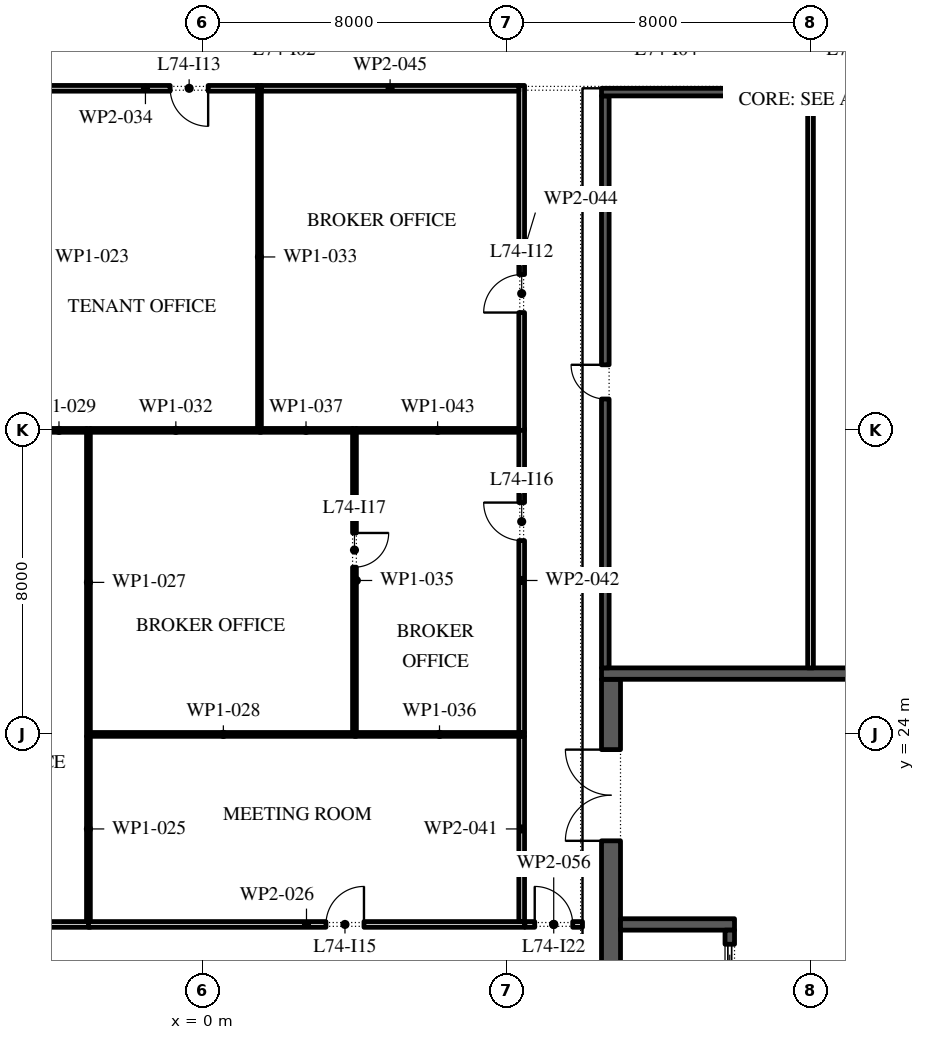
"""IFC4 building model, lengths in metres.
Left out: names, types, materials, properties, quantities, classifications, styles, units other than length and angle.
Written with IfcOpenShell. Run it as: python <this file> out.ifc"""

import sys

from ifc_helpers import new_model, si_unit, direction, frame, frame_2d, origin, place, context, subcontext, project, spatial, rectangle, extrude, element, fill, save


model = new_model("IFC4")
c1 = context("Model", 3, precision=1e-05, world=origin(), true_north=direction((0.0, 1.0)))
c2 = subcontext(c1, "Body", "Model", "MODEL_VIEW")
j1 = project(units=[si_unit("LENGTHUNIT", "METRE"), si_unit("PLANEANGLEUNIT", "RADIAN")], contexts=[c1])
p1 = place(None, origin())
s1 = spatial("IfcSite", under=j1, at=p1, CompositionType="ELEMENT")
p2 = place(p1, origin())
s2 = spatial("IfcBuilding", under=s1, at=p2, CompositionType="ELEMENT")
p3 = place(p2, frame((0.0, 0.0, 338.4)))
s3 = spatial("IfcBuildingStorey", under=s2, at=p3, CompositionType="ELEMENT", Elevation=338.4)
p4 = place(p3, frame((10.75, -2.45, 0.0), z_axis=(0.0, 0.0, 1.0), x_axis=(0.0, 1.0, 0.0)))
e1 = element("IfcWall", 1, at=p4, inside=s3, PredefinedType="SHEAR", context=c2, shape_type="SweptSolid", body=[
    extrude(rectangle(XDim=27.9, YDim=0.5, at=frame_2d((13.95, 0.0))), origin(), (0.0, 0.0, 1.0), 4.0),
])
p5 = place(p4, frame((23.65, 0.0, 0.0)))
e2 = element("IfcOpeningElement", 2, at=p5, cuts=e1, PredefinedType="OPENING", context=c2, shape_type="SweptSolid", body=[
    extrude(rectangle(XDim=2.4, YDim=2.1, at=frame_2d((1.2, 1.05))), frame((0.0, 0.26, 0.0), z_axis=(0.0, -1.0, 0.0), x_axis=(1.0, 0.0, 0.0)), (0.0, 0.0, 1.0), 0.52),
])
p6 = place(p4, frame((1.387, 0.0, 0.0)))
e3 = element("IfcOpeningElement", 3, at=p6, cuts=e1, PredefinedType="OPENING", context=c2, shape_type="SweptSolid", body=[
    extrude(rectangle(XDim=0.9, YDim=2.1, at=frame_2d((0.45, 1.05))), frame((0.0, 0.26, 0.0), z_axis=(0.0, -1.0, 0.0), x_axis=(1.0, 0.0, 0.0)), (0.0, 0.0, 1.0), 0.52),
])
p7 = place(p4, frame((4.562, 0.0, 0.0)))
e4 = element("IfcOpeningElement", 4, at=p7, cuts=e1, PredefinedType="OPENING", context=c2, shape_type="SweptSolid", body=[
    extrude(rectangle(XDim=1.0, YDim=2.1, at=frame_2d((0.5, 1.05))), frame((0.0, 0.26, 0.0), z_axis=(0.0, -1.0, 0.0), x_axis=(1.0, 0.0, 0.0)), (0.0, 0.0, 1.0), 0.52),
])
p8 = place(p3, frame((10.5, 25.6, 0.0), z_axis=(0.0, 0.0, 1.0), x_axis=(1.0, 0.0, 0.0)))
e5 = element("IfcWall", 5, at=p8, inside=s3, PredefinedType="SHEAR", context=c2, shape_type="SweptSolid", body=[
    extrude(rectangle(XDim=11.0, YDim=0.3, at=frame_2d((5.5, 0.0))), origin(), (0.0, 0.0, 1.0), 4.0),
])
p9 = place(p3, frame((11.0, 19.0, 0.0), z_axis=(0.0, 0.0, 1.0), x_axis=(1.0, 0.0, 0.0)))
e6 = element("IfcWall", 6, at=p9, inside=s3, PredefinedType="SHEAR", context=c2, shape_type="SweptSolid", body=[
    extrude(rectangle(XDim=3.0, YDim=0.3, at=frame_2d((1.5, 0.0))), origin(), (0.0, 0.0, 1.0), 4.0),
])
p10 = place(p3, frame((13.875, -2.45, 0.0), z_axis=(0.0, 0.0, 1.0), x_axis=(0.0, 1.0, 0.0)))
e7 = element("IfcWall", 7, at=p10, inside=s3, PredefinedType="SHEAR", context=c2, shape_type="SweptSolid", body=[
    extrude(rectangle(XDim=21.3, YDim=0.25, at=frame_2d((10.65, 0.0))), origin(), (0.0, 0.0, 1.0), 4.0),
])
p11 = place(p10, frame((9.846, 0.0, 0.0)))
e8 = element("IfcOpeningElement", 8, at=p11, cuts=e7, PredefinedType="OPENING", context=c2, shape_type="SweptSolid", body=[
    extrude(rectangle(XDim=0.9, YDim=2.1, at=frame_2d((0.45, 1.05))), frame((0.0, 0.135, 0.0), z_axis=(0.0, -1.0, 0.0), x_axis=(1.0, 0.0, 0.0)), (0.0, 0.0, 1.0), 0.27),
])
p12 = place(p10, frame((12.911, 0.0, 0.0)))
e9 = element("IfcOpeningElement", 9, at=p12, cuts=e7, PredefinedType="OPENING", context=c2, shape_type="SweptSolid", body=[
    extrude(rectangle(XDim=0.9, YDim=2.1, at=frame_2d((0.45, 1.05))), frame((0.0, 0.135, 0.0), z_axis=(0.0, -1.0, 0.0), x_axis=(1.0, 0.0, 0.0)), (0.0, 0.0, 1.0), 0.27),
])
p13 = place(p10, frame((6.971, 0.0, 0.0)))
e10 = element("IfcOpeningElement", 10, at=p13, cuts=e7, PredefinedType="OPENING", context=c2, shape_type="SweptSolid", body=[
    extrude(rectangle(XDim=1.1, YDim=2.1, at=frame_2d((0.55, 1.05))), frame((0.0, 0.135, 0.0), z_axis=(0.0, -1.0, 0.0), x_axis=(1.0, 0.0, 0.0)), (0.0, 0.0, 1.0), 0.27),
])
p14 = place(p10, frame((15.543, 0.0, 0.0)))
e11 = element("IfcOpeningElement", 11, at=p14, cuts=e7, PredefinedType="OPENING", context=c2, shape_type="SweptSolid", body=[
    extrude(rectangle(XDim=1.1, YDim=2.1, at=frame_2d((0.55, 1.05))), frame((0.0, 0.135, 0.0), z_axis=(0.0, -1.0, 0.0), x_axis=(1.0, 0.0, 0.0)), (0.0, 0.0, 1.0), 0.27),
])
p15 = place(p10, frame((17.686, 0.0, 0.0)))
e12 = element("IfcOpeningElement", 12, at=p15, cuts=e7, PredefinedType="OPENING", context=c2, shape_type="SweptSolid", body=[
    extrude(rectangle(XDim=1.1, YDim=2.1, at=frame_2d((0.55, 1.05))), frame((0.0, 0.135, 0.0), z_axis=(0.0, -1.0, 0.0), x_axis=(1.0, 0.0, 0.0)), (0.0, 0.0, 1.0), 0.27),
])
p16 = place(p10, frame((19.829, 0.0, 0.0)))
e13 = element("IfcOpeningElement", 13, at=p16, cuts=e7, PredefinedType="OPENING", context=c2, shape_type="SweptSolid", body=[
    extrude(rectangle(XDim=1.1, YDim=2.1, at=frame_2d((0.55, 1.05))), frame((0.0, 0.135, 0.0), z_axis=(0.0, -1.0, 0.0), x_axis=(1.0, 0.0, 0.0)), (0.0, 0.0, 1.0), 0.27),
])
p17 = place(p3, frame((10.6, 25.75, 0.0), z_axis=(0.0, 0.0, 1.0), x_axis=(0.0, 1.0, 0.0)))
e14 = element("IfcWall", 14, at=p17, inside=s3, PredefinedType="SHEAR", context=c2, shape_type="SweptSolid", body=[
    extrude(rectangle(XDim=15.05, YDim=0.2, at=frame_2d((7.525, 0.0))), origin(), (0.0, 0.0, 1.0), 4.0),
])
p18 = place(p17, frame((7.075, 0.0, 0.0)))
e15 = element("IfcOpeningElement", 15, at=p18, cuts=e14, PredefinedType="OPENING", context=c2, shape_type="SweptSolid", body=[
    extrude(rectangle(XDim=0.9, YDim=2.1, at=frame_2d((0.45, 1.05))), frame((0.0, 0.11, 0.0), z_axis=(0.0, -1.0, 0.0), x_axis=(1.0, 0.0, 0.0)), (0.0, 0.0, 1.0), 0.22),
])
p19 = place(p3, frame((10.5, 40.9, 0.0), z_axis=(0.0, 0.0, 1.0), x_axis=(1.0, 0.0, 0.0)))
e16 = element("IfcWall", 16, at=p19, inside=s3, PredefinedType="SHEAR", context=c2, shape_type="SweptSolid", body=[
    extrude(rectangle(XDim=11.0, YDim=0.2, at=frame_2d((5.5, 0.0))), origin(), (0.0, 0.0, 1.0), 4.0),
])
p20 = place(p3, frame((16.0, 25.75, 0.0), z_axis=(0.0, 0.0, 1.0), x_axis=(0.0, 1.0, 0.0)))
e17 = element("IfcWall", 17, at=p20, inside=s3, PredefinedType="PARTITIONING", context=c2, shape_type="SweptSolid", body=[
    extrude(rectangle(XDim=15.05, YDim=0.15, at=frame_2d((7.525, 0.0))), origin(), (0.0, 0.0, 1.0), 4.0),
])
p21 = place(p3, frame((-8.475, 19.0, 0.0), z_axis=(0.0, 0.0, 1.0), x_axis=(1.0, 0.0, 0.0)))
e18 = element("IfcWall", 18, at=p21, inside=s3, PredefinedType="PARTITIONING", context=c2, shape_type="SweptSolid", body=[
    extrude(rectangle(XDim=5.525, YDim=0.15, at=frame_2d((2.763, 0.0))), origin(), (0.0, 0.0, 1.0), 4.0),
])
p22 = place(p3, frame((-3.0, 19.075, 0.0), z_axis=(0.0, 0.0, 1.0), x_axis=(0.0, 1.0, 0.0)))
e19 = element("IfcWall", 19, at=p22, inside=s3, PredefinedType="PARTITIONING", context=c2, shape_type="SweptSolid", body=[
    extrude(rectangle(XDim=4.875, YDim=0.1, at=frame_2d((2.438, 0.0))), origin(), (0.0, 0.0, 1.0), 4.0),
])
p23 = place(p3, frame((-3.0, 19.0, 0.0), z_axis=(0.0, 0.0, 1.0), x_axis=(1.0, 0.0, 0.0)))
e20 = element("IfcWall", 20, at=p23, inside=s3, PredefinedType="PARTITIONING", context=c2, shape_type="SweptSolid", body=[
    extrude(rectangle(XDim=11.475, YDim=0.15, at=frame_2d((5.738, 0.0))), origin(), (0.0, 0.0, 1.0), 4.0),
])
p24 = place(p23, frame((6.25, 0.0, 0.0)))
e21 = element("IfcOpeningElement", 21, at=p24, cuts=e20, PredefinedType="OPENING", context=c2, shape_type="SweptSolid", body=[
    extrude(rectangle(XDim=1.0, YDim=2.1, at=frame_2d((0.5, 1.05))), frame((0.0, 0.085, 0.0), z_axis=(0.0, -1.0, 0.0), x_axis=(1.0, 0.0, 0.0)), (0.0, 0.0, 1.0), 0.17),
])
p25 = place(p3, frame((-3.0, 23.95, 0.0), z_axis=(0.0, 0.0, 1.0), x_axis=(0.0, 1.0, 0.0)))
e22 = element("IfcWall", 22, at=p25, inside=s3, PredefinedType="PARTITIONING", context=c2, shape_type="SweptSolid", body=[
    extrude(rectangle(XDim=8.1, YDim=0.1, at=frame_2d((4.05, 0.0))), origin(), (0.0, 0.0, 1.0), 4.0),
])
p26 = place(p3, frame((-2.95, 24.0, 0.0), z_axis=(0.0, 0.0, 1.0), x_axis=(1.0, 0.0, 0.0)))
e23 = element("IfcWall", 23, at=p26, inside=s3, PredefinedType="PARTITIONING", context=c2, shape_type="SweptSolid", body=[
    extrude(rectangle(XDim=7.0, YDim=0.1, at=frame_2d((3.5, 0.0))), origin(), (0.0, 0.0, 1.0), 4.0),
])
p27 = place(p3, frame((-3.05, 32.0, 0.0), z_axis=(0.0, 0.0, 1.0), x_axis=(-1.0, 0.0, 0.0)))
e24 = element("IfcWall", 24, at=p27, inside=s3, PredefinedType="PARTITIONING", context=c2, shape_type="SweptSolid", body=[
    extrude(rectangle(XDim=1.45, YDim=0.1, at=frame_2d((0.725, 0.0))), origin(), (0.0, 0.0, 1.0), 4.0),
])
p28 = place(p3, frame((1.55, 32.0, 0.0), z_axis=(0.0, 0.0, 1.0), x_axis=(-1.0, 0.0, 0.0)))
e25 = element("IfcWall", 25, at=p28, inside=s3, PredefinedType="PARTITIONING", context=c2, shape_type="SweptSolid", body=[
    extrude(rectangle(XDim=4.5, YDim=0.1, at=frame_2d((2.25, 0.0))), origin(), (0.0, 0.0, 1.0), 4.0),
])
p29 = place(p3, frame((1.5, 32.05, 0.0), z_axis=(0.0, 0.0, 1.0), x_axis=(0.0, 1.0, 0.0)))
e26 = element("IfcWall", 26, at=p29, inside=s3, PredefinedType="PARTITIONING", context=c2, shape_type="SweptSolid", body=[
    extrude(rectangle(XDim=9.025, YDim=0.1, at=frame_2d((4.512, 0.0))), origin(), (0.0, 0.0, 1.0), 4.0),
])
p30 = place(p3, frame((1.45, 41.0, 0.0), z_axis=(0.0, 0.0, 1.0), x_axis=(-1.0, 0.0, 0.0)))
e27 = element("IfcWall", 27, at=p30, inside=s3, PredefinedType="PARTITIONING", context=c2, shape_type="SweptSolid", body=[
    extrude(rectangle(XDim=5.9, YDim=0.15, at=frame_2d((2.95, 0.0))), origin(), (0.0, 0.0, 1.0), 4.0),
])
p31 = place(p30, frame((1.3, 0.0, 0.0)))
e28 = element("IfcOpeningElement", 28, at=p31, cuts=e27, PredefinedType="OPENING", context=c2, shape_type="SweptSolid", body=[
    extrude(rectangle(XDim=1.0, YDim=2.1, at=frame_2d((0.5, 1.05))), frame((0.0, 0.085, 0.0), z_axis=(0.0, -1.0, 0.0), x_axis=(1.0, 0.0, 0.0)), (0.0, 0.0, 1.0), 0.17),
])
p32 = place(p3, frame((4.0, 24.05, 0.0), z_axis=(0.0, 0.0, 1.0), x_axis=(0.0, 1.0, 0.0)))
e29 = element("IfcWall", 29, at=p32, inside=s3, PredefinedType="PARTITIONING", context=c2, shape_type="SweptSolid", body=[
    extrude(rectangle(XDim=8.0, YDim=0.1, at=frame_2d((4.0, 0.0))), origin(), (0.0, 0.0, 1.0), 4.0),
])
p33 = place(p32, frame((4.35, 0.0, 0.0)))
e30 = element("IfcOpeningElement", 30, at=p33, cuts=e29, PredefinedType="OPENING", context=c2, shape_type="SweptSolid", body=[
    extrude(rectangle(XDim=0.9, YDim=2.1, at=frame_2d((0.45, 1.05))), frame((0.0, 0.06, 0.0), z_axis=(0.0, -1.0, 0.0), x_axis=(1.0, 0.0, 0.0)), (0.0, 0.0, 1.0), 0.12),
])
p34 = place(p3, frame((4.0, 24.0, 0.0), z_axis=(0.0, 0.0, 1.0), x_axis=(1.0, 0.0, 0.0)))
e31 = element("IfcWall", 31, at=p34, inside=s3, PredefinedType="PARTITIONING", context=c2, shape_type="SweptSolid", body=[
    extrude(rectangle(XDim=4.475, YDim=0.1, at=frame_2d((2.238, 0.0))), origin(), (0.0, 0.0, 1.0), 4.0),
])
p35 = place(p3, frame((3.95, 32.0, 0.0), z_axis=(0.0, 0.0, 1.0), x_axis=(-1.0, 0.0, 0.0)))
e32 = element("IfcWall", 32, at=p35, inside=s3, PredefinedType="PARTITIONING", context=c2, shape_type="SweptSolid", body=[
    extrude(rectangle(XDim=2.45, YDim=0.1, at=frame_2d((1.225, 0.0))), origin(), (0.0, 0.0, 1.0), 4.0),
])
p36 = place(p3, frame((8.4, 19.075, 0.0), z_axis=(0.0, 0.0, 1.0), x_axis=(0.0, 1.0, 0.0)))
e33 = element("IfcWall", 33, at=p36, inside=s3, PredefinedType="PARTITIONING", context=c2, shape_type="SweptSolid", body=[
    extrude(rectangle(XDim=4.875, YDim=0.15, at=frame_2d((2.438, 0.0))), origin(), (0.0, 0.0, 1.0), 4.0),
])
p37 = place(p3, frame((8.4, 24.05, 0.0), z_axis=(0.0, 0.0, 1.0), x_axis=(0.0, 1.0, 0.0)))
e34 = element("IfcWall", 34, at=p37, inside=s3, PredefinedType="PARTITIONING", context=c2, shape_type="SweptSolid", body=[
    extrude(rectangle(XDim=8.0, YDim=0.15, at=frame_2d((4.0, 0.0))), origin(), (0.0, 0.0, 1.0), 4.0),
])
p38 = place(p37, frame((5.05, 0.0, 0.0)))
e35 = element("IfcOpeningElement", 35, at=p38, cuts=e34, PredefinedType="OPENING", context=c2, shape_type="SweptSolid", body=[
    extrude(rectangle(XDim=1.0, YDim=2.1, at=frame_2d((0.5, 1.05))), frame((0.0, 0.085, 0.0), z_axis=(0.0, -1.0, 0.0), x_axis=(1.0, 0.0, 0.0)), (0.0, 0.0, 1.0), 0.17),
])
p39 = place(p3, frame((8.325, 32.0, 0.0), z_axis=(0.0, 0.0, 1.0), x_axis=(-1.0, 0.0, 0.0)))
e36 = element("IfcWall", 36, at=p39, inside=s3, PredefinedType="PARTITIONING", context=c2, shape_type="SweptSolid", body=[
    extrude(rectangle(XDim=4.275, YDim=0.1, at=frame_2d((2.137, 0.0))), origin(), (0.0, 0.0, 1.0), 4.0),
])
p40 = place(p3, frame((8.4, 32.0, 0.0), z_axis=(0.0, 0.0, 1.0), x_axis=(0.0, 1.0, 0.0)))
e37 = element("IfcWall", 37, at=p40, inside=s3, PredefinedType="PARTITIONING", context=c2, shape_type="SweptSolid", body=[
    extrude(rectangle(XDim=9.075, YDim=0.15, at=frame_2d((4.538, 0.0))), origin(), (0.0, 0.0, 1.0), 4.0),
])
p41 = place(p40, frame((3.1, 0.0, 0.0)))
e38 = element("IfcOpeningElement", 38, at=p41, cuts=e37, PredefinedType="OPENING", context=c2, shape_type="SweptSolid", body=[
    extrude(rectangle(XDim=1.0, YDim=2.1, at=frame_2d((0.5, 1.05))), frame((0.0, 0.085, 0.0), z_axis=(0.0, -1.0, 0.0), x_axis=(1.0, 0.0, 0.0)), (0.0, 0.0, 1.0), 0.17),
])
p42 = place(p3, frame((8.325, 41.0, 0.0), z_axis=(0.0, 0.0, 1.0), x_axis=(-1.0, 0.0, 0.0)))
e39 = element("IfcWall", 39, at=p42, inside=s3, PredefinedType="PARTITIONING", context=c2, shape_type="SweptSolid", body=[
    extrude(rectangle(XDim=6.775, YDim=0.15, at=frame_2d((3.387, 0.0))), origin(), (0.0, 0.0, 1.0), 4.0),
])
p43 = place(p3, frame((8.485, 19.0, 0.0), z_axis=(0.0, 0.0, 1.0), x_axis=(1.0, 0.0, 0.0)))
e40 = element("IfcWall", 40, at=p43, inside=s3, PredefinedType="PARTITIONING", context=c2, shape_type="SweptSolid", body=[
    extrude(rectangle(XDim=1.515, YDim=0.15, at=frame_2d((0.757, 0.0))), origin(), (0.0, 0.0, 1.0), 4.0),
])
p44 = place(p43, frame((0.258, 0.0, 0.0)))
e41 = element("IfcOpeningElement", 41, at=p44, cuts=e40, PredefinedType="OPENING", context=c2, shape_type="SweptSolid", body=[
    extrude(rectangle(XDim=1.0, YDim=2.1, at=frame_2d((0.5, 1.05))), frame((0.0, 0.085, 0.0), z_axis=(0.0, -1.0, 0.0), x_axis=(1.0, 0.0, 0.0)), (0.0, 0.0, 1.0), 0.17),
])
p45 = place(p16, origin())
e42 = element("IfcDoor", 42, at=p45, inside=s3, OperationType="SLIDING_TO_LEFT", PredefinedType="DOOR", context=c2, shape_type="SweptSolid", body=[
    extrude(rectangle(XDim=1.1, YDim=2.1, at=frame_2d((0.55, 1.05))), frame((0.0, 0.025, 0.0), z_axis=(0.0, -1.0, 0.0), x_axis=(1.0, 0.0, 0.0)), (0.0, 0.0, 1.0), 0.05),
])
fill(e13, e42)
p46 = place(p5, origin())
e43 = element("IfcDoor", 43, at=p46, inside=s3, OperationType="DOUBLE_DOOR_SINGLE_SWING", PredefinedType="DOOR", context=c2, shape_type="SweptSolid", body=[
    extrude(rectangle(XDim=2.4, YDim=2.1, at=frame_2d((1.2, 1.05))), frame((0.0, 0.025, 0.0), z_axis=(0.0, -1.0, 0.0), x_axis=(1.0, 0.0, 0.0)), (0.0, 0.0, 1.0), 0.05),
])
fill(e2, e43)
p47 = place(p18, origin())
e44 = element("IfcDoor", 44, at=p47, inside=s3, OperationType="SINGLE_SWING_LEFT", PredefinedType="DOOR", context=c2, shape_type="SweptSolid", body=[
    extrude(rectangle(XDim=0.9, YDim=2.1, at=frame_2d((0.45, 1.05))), frame((0.0, -0.05, 0.0), z_axis=(0.0, -1.0, 0.0), x_axis=(1.0, 0.0, 0.0)), (0.0, 0.0, 1.0), 0.05),
])
fill(e15, e44)
p48 = place(p41, origin())
e45 = element("IfcDoor", 45, at=p48, inside=s3, OperationType="SINGLE_SWING_RIGHT", PredefinedType="DOOR", context=c2, shape_type="SweptSolid", body=[
    extrude(rectangle(XDim=1.0, YDim=2.1, at=frame_2d((0.5, 1.05))), frame((0.0, 0.025, 0.0), z_axis=(0.0, -1.0, 0.0), x_axis=(1.0, 0.0, 0.0)), (0.0, 0.0, 1.0), 0.05),
])
fill(e38, e45)
p49 = place(p31, origin())
e46 = element("IfcDoor", 46, at=p49, inside=s3, OperationType="SINGLE_SWING_RIGHT", PredefinedType="DOOR", context=c2, shape_type="SweptSolid", body=[
    extrude(rectangle(XDim=1.0, YDim=2.1, at=frame_2d((0.5, 1.05))), frame((0.0, 0.025, 0.0), z_axis=(0.0, -1.0, 0.0), x_axis=(1.0, 0.0, 0.0)), (0.0, 0.0, 1.0), 0.05),
])
fill(e28, e46)
p50 = place(p24, origin())
e47 = element("IfcDoor", 47, at=p50, inside=s3, OperationType="SINGLE_SWING_LEFT", PredefinedType="DOOR", context=c2, shape_type="SweptSolid", body=[
    extrude(rectangle(XDim=1.0, YDim=2.1, at=frame_2d((0.5, 1.05))), frame((0.0, 0.025, 0.0), z_axis=(0.0, -1.0, 0.0), x_axis=(1.0, 0.0, 0.0)), (0.0, 0.0, 1.0), 0.05),
])
fill(e21, e47)
p51 = place(p38, origin())
e48 = element("IfcDoor", 48, at=p51, inside=s3, OperationType="SINGLE_SWING_LEFT", PredefinedType="DOOR", context=c2, shape_type="SweptSolid", body=[
    extrude(rectangle(XDim=1.0, YDim=2.1, at=frame_2d((0.5, 1.05))), frame((0.0, 0.025, 0.0), z_axis=(0.0, -1.0, 0.0), x_axis=(1.0, 0.0, 0.0)), (0.0, 0.0, 1.0), 0.05),
])
fill(e35, e48)
p52 = place(p33, frame((0.9, 0.0, 0.0), z_axis=(0.0, 0.0, 1.0), x_axis=(-1.0, 0.0, 0.0)))
e49 = element("IfcDoor", 49, at=p52, inside=s3, OperationType="SINGLE_SWING_RIGHT", PredefinedType="DOOR", context=c2, shape_type="SweptSolid", body=[
    extrude(rectangle(XDim=0.9, YDim=2.1, at=frame_2d((0.45, 1.05))), frame((0.0, 0.025, 0.0), z_axis=(0.0, -1.0, 0.0), x_axis=(1.0, 0.0, 0.0)), (0.0, 0.0, 1.0), 0.05),
])
fill(e30, e49)
p53 = place(p44, origin())
e50 = element("IfcDoor", 50, at=p53, inside=s3, OperationType="SINGLE_SWING_RIGHT", PredefinedType="DOOR", context=c2, shape_type="SweptSolid", body=[
    extrude(rectangle(XDim=1.0, YDim=2.1, at=frame_2d((0.5, 1.05))), frame((0.0, 0.025, 0.0), z_axis=(0.0, -1.0, 0.0), x_axis=(1.0, 0.0, 0.0)), (0.0, 0.0, 1.0), 0.05),
])
fill(e41, e50)
save(model, sys.argv[1])
